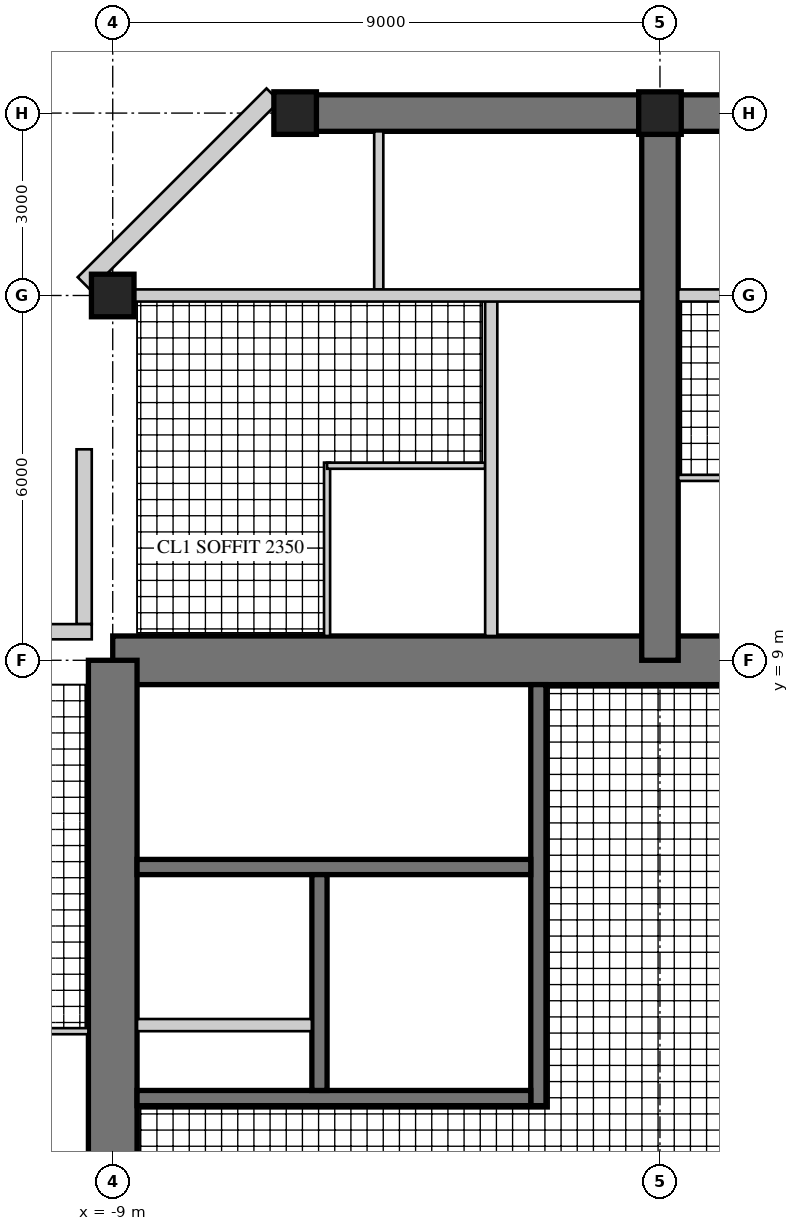
"""IFC4 building model, lengths in metres.
Left out: names, types, materials, properties, quantities, classifications, styles, units other than length and angle.
Written with IfcOpenShell. Run it as: python <this file> out.ifc"""

import sys

from ifc_helpers import new_model, si_unit, direction, frame, frame_2d, origin, origin_2d, place, context, subcontext, project, spatial, rectangle, hollow_rectangle, extrude, element, fill, save


model = new_model("IFC4")
c1 = context("Model", 3, precision=1e-05, world=origin(), true_north=direction((0.0, 1.0)))
c2 = subcontext(c1, "Body", "Model", "MODEL_VIEW")
j1 = project(units=[si_unit("LENGTHUNIT", "METRE"), si_unit("PLANEANGLEUNIT", "RADIAN")], contexts=[c1])
p1 = place(None, origin())
s1 = spatial("IfcSite", under=j1, at=p1, CompositionType="ELEMENT")
p2 = place(p1, origin())
s2 = spatial("IfcBuilding", under=s1, at=p2, CompositionType="ELEMENT")
p3 = place(p2, frame((0.0, 0.0, 278.1)))
s3 = spatial("IfcBuildingStorey", under=s2, at=p3, CompositionType="ELEMENT", Elevation=278.1)
p4 = place(p3, frame((9.0, 9.0, 0.0), z_axis=(0.0, 0.0, 1.0), x_axis=(-1.0, 0.0, 0.0)))
e1 = element("IfcWall", 1, at=p4, inside=s3, PredefinedType="SHEAR", context=c2, shape_type="SweptSolid", body=[
    extrude(rectangle(XDim=18.0, YDim=0.8, at=frame_2d((9.0, 0.0))), origin(), (0.0, 0.0, 1.0), 3.4),
])
p5 = place(p4, frame((9.8, 0.0, 0.0)))
e2 = element("IfcOpeningElement", 2, at=p5, cuts=e1, PredefinedType="OPENING", context=c2, shape_type="SweptSolid", body=[
    extrude(rectangle(XDim=1.0, YDim=2.4, at=frame_2d((0.5, 1.2))), frame((0.0, 0.41, 0.0), z_axis=(0.0, -1.0, 0.0), x_axis=(1.0, 0.0, 0.0)), (0.0, 0.0, 1.0), 0.82),
])
p6 = place(p3, frame((-9.0, 9.0, 0.0), z_axis=(0.0, 0.0, 1.0), x_axis=(0.0, -1.0, 0.0)))
e3 = element("IfcWall", 3, at=p6, inside=s3, PredefinedType="SHEAR", context=c2, shape_type="SweptSolid", body=[
    extrude(rectangle(XDim=18.0, YDim=0.8, at=frame_2d((9.0, 0.0))), origin(), (0.0, 0.0, 1.0), 3.4),
])
p7 = place(p6, frame((9.8, 0.0, 0.0)))
e4 = element("IfcOpeningElement", 4, at=p7, cuts=e3, PredefinedType="OPENING", context=c2, shape_type="SweptSolid", body=[
    extrude(rectangle(XDim=1.0, YDim=2.4, at=frame_2d((0.5, 1.2))), frame((0.0, 0.41, 0.0), z_axis=(0.0, -1.0, 0.0), x_axis=(1.0, 0.0, 0.0)), (0.0, 0.0, 1.0), 0.82),
])
p8 = place(p3, frame((-2.0, 1.675, 0.0), z_axis=(0.0, 0.0, 1.0), x_axis=(0.0, 1.0, 0.0)))
e5 = element("IfcWall", 5, at=p8, inside=s3, PredefinedType="SHEAR", context=c2, shape_type="SweptSolid", body=[
    extrude(rectangle(XDim=6.925, YDim=0.25, at=frame_2d((3.462, 0.0))), origin(), (0.0, 0.0, 1.0), 3.4),
])
p9 = place(p8, frame((0.725, 0.0, 0.0)))
e6 = element("IfcOpeningElement", 6, at=p9, cuts=e5, PredefinedType="OPENING", context=c2, shape_type="SweptSolid", body=[
    extrude(rectangle(XDim=1.0, YDim=2.1, at=frame_2d((0.5, 1.05))), frame((0.0, 0.135, 0.0), z_axis=(0.0, -1.0, 0.0), x_axis=(1.0, 0.0, 0.0)), (0.0, 0.0, 1.0), 0.27),
])
p10 = place(p3, frame((-2.125, 1.8, 0.0), z_axis=(0.0, 0.0, 1.0), x_axis=(-1.0, 0.0, 0.0)))
e7 = element("IfcWall", 7, at=p10, inside=s3, PredefinedType="SHEAR", context=c2, shape_type="SweptSolid", body=[
    extrude(rectangle(XDim=6.475, YDim=0.25, at=frame_2d((3.238, 0.0))), origin(), (0.0, 0.0, 1.0), 3.4),
])
p11 = place(p3, frame((-2.125, 5.6, 0.0), z_axis=(0.0, 0.0, 1.0), x_axis=(-1.0, 0.0, 0.0)))
e8 = element("IfcWall", 8, at=p11, inside=s3, PredefinedType="SHEAR", context=c2, shape_type="SweptSolid", body=[
    extrude(rectangle(XDim=6.475, YDim=0.25, at=frame_2d((3.238, 0.0))), origin(), (0.0, 0.0, 1.0), 3.4),
])
p12 = place(p11, frame((0.175, 0.0, 0.0)))
e9 = element("IfcOpeningElement", 9, at=p12, cuts=e8, PredefinedType="OPENING", context=c2, shape_type="SweptSolid", body=[
    extrude(rectangle(XDim=1.0, YDim=2.1, at=frame_2d((0.5, 1.05))), frame((0.0, 0.135, 0.0), z_axis=(0.0, -1.0, 0.0), x_axis=(1.0, 0.0, 0.0)), (0.0, 0.0, 1.0), 0.27),
])
p13 = place(p3, frame((-5.6, 1.925, 0.0), z_axis=(0.0, 0.0, 1.0), x_axis=(0.0, 1.0, 0.0)))
e10 = element("IfcWall", 10, at=p13, inside=s3, PredefinedType="SHEAR", context=c2, shape_type="SweptSolid", body=[
    extrude(rectangle(XDim=3.55, YDim=0.25, at=frame_2d((1.775, 0.0))), origin(), (0.0, 0.0, 1.0), 3.4),
])
p14 = place(p13, frame((1.525, 0.0, 0.0)))
e11 = element("IfcOpeningElement", 11, at=p14, cuts=e10, PredefinedType="OPENING", context=c2, shape_type="SweptSolid", body=[
    extrude(rectangle(XDim=1.1, YDim=2.2, at=frame_2d((0.55, 1.1))), frame((0.0, 0.135, 0.0), z_axis=(0.0, -1.0, 0.0), x_axis=(1.0, 0.0, 0.0)), (0.0, 0.0, 1.0), 0.27),
])
p15 = place(p13, frame((0.075, 0.0, 0.0)))
e12 = element("IfcOpeningElement", 12, at=p15, cuts=e10, PredefinedType="OPENING", context=c2, shape_type="SweptSolid", body=[
    extrude(rectangle(XDim=0.8, YDim=2.1, at=frame_2d((0.4, 1.05))), frame((0.0, 0.135, 0.0), z_axis=(0.0, -1.0, 0.0), x_axis=(1.0, 0.0, 0.0)), (0.0, 0.0, 1.0), 0.27),
])
p16 = place(p3, frame((-5.725, 3.0, 0.0), z_axis=(0.0, 0.0, 1.0), x_axis=(-1.0, 0.0, 0.0)))
e13 = element("IfcWall", 13, at=p16, inside=s3, PredefinedType="PARTITIONING", context=c2, shape_type="SweptSolid", body=[
    extrude(rectangle(XDim=2.875, YDim=0.2, at=frame_2d((1.438, 0.0))), origin(), (0.0, 0.0, 1.0), 3.4),
])
p17 = place(p3, frame((0.0, 9.0, 0.0), z_axis=(0.0, 0.0, 1.0), x_axis=(0.0, 1.0, 0.0)))
e14 = element("IfcWall", 14, at=p17, inside=s3, PredefinedType="SHEAR", context=c2, shape_type="SweptSolid", body=[
    extrude(rectangle(XDim=9.0, YDim=0.6, at=frame_2d((4.5, 0.0))), origin(), (0.0, 0.0, 1.0), 3.4),
])
p18 = place(p17, frame((3.8, 0.0, 0.0)))
e15 = element("IfcOpeningElement", 15, at=p18, cuts=e14, PredefinedType="OPENING", context=c2, shape_type="SweptSolid", body=[
    extrude(rectangle(XDim=1.0, YDim=2.15, at=frame_2d((0.5, 1.075))), frame((0.0, 0.31, 0.0), z_axis=(0.0, -1.0, 0.0), x_axis=(1.0, 0.0, 0.0)), (0.0, 0.0, 1.0), 0.62),
])
p19 = place(p17, frame((7.0, 0.0, 0.0)))
e16 = element("IfcOpeningElement", 16, at=p19, cuts=e14, PredefinedType="OPENING", context=c2, shape_type="SweptSolid", body=[
    extrude(rectangle(XDim=1.0, YDim=2.2, at=frame_2d((0.5, 1.1))), frame((0.0, 0.31, 0.0), z_axis=(0.0, -1.0, 0.0), x_axis=(1.0, 0.0, 0.0)), (0.0, 0.0, 1.0), 0.62),
])
p20 = place(p3, frame((6.0, 18.0, 0.0), z_axis=(0.0, 0.0, 1.0), x_axis=(-1.0, 0.0, 0.0)))
e17 = element("IfcWall", 17, at=p20, inside=s3, PredefinedType="SHEAR", context=c2, shape_type="SweptSolid", body=[
    extrude(rectangle(XDim=12.0, YDim=0.6, at=frame_2d((6.0, 0.0))), origin(), (0.0, 0.0, 1.0), 3.4),
])
p21 = place(p20, frame((1.625, 0.0, 0.6)))
e18 = element("IfcOpeningElement", 18, at=p21, cuts=e17, PredefinedType="OPENING", context=c2, shape_type="SweptSolid", body=[
    extrude(rectangle(XDim=3.0, YDim=2.4, at=frame_2d((1.5, 1.2))), frame((0.0, 0.31, 0.0), z_axis=(0.0, -1.0, 0.0), x_axis=(1.0, 0.0, 0.0)), (0.0, 0.0, 1.0), 0.62),
])
p22 = place(p20, frame((7.375, 0.0, 0.6)))
e19 = element("IfcOpeningElement", 19, at=p22, cuts=e17, PredefinedType="OPENING", context=c2, shape_type="SweptSolid", body=[
    extrude(rectangle(XDim=3.0, YDim=2.4, at=frame_2d((1.5, 1.2))), frame((0.0, 0.31, 0.0), z_axis=(0.0, -1.0, 0.0), x_axis=(1.0, 0.0, 0.0)), (0.0, 0.0, 1.0), 0.62),
])
for number, where, z_axis, x_axis in (
    (20, (-9.0, 15.0, 0.0), (0.0, 0.0, 1.0), (1.0, 0.0, 0.0)),
    (21, (0.0, 18.0, 0.0), (0.0, 0.0, 1.0), (1.0, 0.0, 0.0)),
    (22, (-6.0, 18.0, 0.0), (0.0, 0.0, 1.0), (1.0, 0.0, 0.0)),
):
    element("IfcColumn", number, at=place(p3, frame(where, z_axis=z_axis, x_axis=x_axis)), inside=s3, PredefinedType="COLUMN", context=c2, shape_type="SweptSolid", body=[
        extrude(rectangle(XDim=0.7, YDim=0.7, at=origin_2d()), origin(), (0.0, 0.0, 1.0), 3.4),
    ])
p23 = place(p3, frame((-6.365, 18.3, 0.0), z_axis=(0.0, 0.0, 1.0), x_axis=(-0.70707898447, -0.707134576811, 0.0)))
e23 = element("IfcWall", 23, at=p23, inside=s3, PredefinedType="SOLIDWALL", context=c2, shape_type="SweptSolid", body=[
    extrude(rectangle(XDim=4.392, YDim=0.3, at=frame_2d((2.196, 0.0))), origin(), (0.0, 0.0, 1.0), 3.22),
])
p24 = place(p23, frame((1.746, 0.0, 0.3)))
e24 = element("IfcOpeningElement", 24, at=p24, cuts=e23, PredefinedType="OPENING", context=c2, shape_type="SweptSolid", body=[
    extrude(rectangle(XDim=0.9, YDim=2.4, at=frame_2d((0.45, 1.2))), frame((0.0, 0.16, 0.0), z_axis=(0.0, -1.0, 0.0), x_axis=(1.0, 0.0, 0.0)), (0.0, 0.0, 1.0), 0.32),
])
p25 = place(p3, frame((-9.47, 12.47, 0.0), z_axis=(0.0, 0.0, 1.0), x_axis=(0.0, -1.0, 0.0)))
e25 = element("IfcWall", 25, at=p25, inside=s3, PredefinedType="SOLIDWALL", context=c2, shape_type="SweptSolid", body=[
    extrude(rectangle(XDim=2.875, YDim=0.25, at=frame_2d((1.438, 0.0))), origin(), (0.0, 0.0, 1.0), 3.22),
])
p26 = place(p25, frame((0.6, 0.0, 0.0)))
e26 = element("IfcOpeningElement", 26, at=p26, cuts=e25, PredefinedType="OPENING", context=c2, shape_type="SweptSolid", body=[
    extrude(rectangle(XDim=1.0, YDim=2.2, at=frame_2d((0.5, 1.1))), frame((0.0, 0.135, 0.0), z_axis=(0.0, -1.0, 0.0), x_axis=(1.0, 0.0, 0.0)), (0.0, 0.0, 1.0), 0.27),
])
p27 = place(p3, frame((-9.345, 9.47, 0.0), z_axis=(0.0, 0.0, 1.0), x_axis=(-1.0, 0.0, 0.0)))
e27 = element("IfcWall", 27, at=p27, inside=s3, PredefinedType="SOLIDWALL", context=c2, shape_type="SweptSolid", body=[
    extrude(rectangle(XDim=3.125, YDim=0.25, at=frame_2d((1.562, 0.0))), origin(), (0.0, 0.0, 1.0), 3.22),
])
p28 = place(p27, frame((0.6, 0.0, 0.0)))
e28 = element("IfcOpeningElement", 28, at=p28, cuts=e27, PredefinedType="OPENING", context=c2, shape_type="SweptSolid", body=[
    extrude(rectangle(XDim=1.0, YDim=2.2, at=frame_2d((0.5, 1.1))), frame((0.0, 0.135, 0.0), z_axis=(0.0, -1.0, 0.0), x_axis=(1.0, 0.0, 0.0)), (0.0, 0.0, 1.0), 0.27),
])
p29 = place(p3, frame((-5.475, 9.4, 0.0), z_axis=(0.0, 0.0, 1.0), x_axis=(0.0, 1.0, 0.0)))
e29 = element("IfcWall", 29, at=p29, inside=s3, PredefinedType="PARTITIONING", context=c2, shape_type="SweptSolid", body=[
    extrude(rectangle(XDim=2.85, YDim=0.1, at=frame_2d((1.425, 0.0))), origin(), (0.0, 0.0, 1.0), 3.22),
])
p30 = place(p3, frame((-2.875, 12.2, 0.0), z_axis=(0.0, 0.0, 1.0), x_axis=(-1.0, 0.0, 0.0)))
e30 = element("IfcWall", 30, at=p30, inside=s3, PredefinedType="PARTITIONING", context=c2, shape_type="SweptSolid", body=[
    extrude(rectangle(XDim=2.6, YDim=0.1, at=frame_2d((1.3, 0.0))), origin(), (0.0, 0.0, 1.0), 3.22),
])
p31 = place(p30, frame((0.55, 0.0, 0.0)))
e31 = element("IfcOpeningElement", 31, at=p31, cuts=e30, PredefinedType="OPENING", context=c2, shape_type="SweptSolid", body=[
    extrude(rectangle(XDim=0.9, YDim=2.1, at=frame_2d((0.45, 1.05))), frame((0.0, 0.06, 0.0), z_axis=(0.0, -1.0, 0.0), x_axis=(1.0, 0.0, 0.0)), (0.0, 0.0, 1.0), 0.12),
])
p32 = place(p3, frame((9.345, 12.0, 0.0), z_axis=(0.0, 0.0, 1.0), x_axis=(-1.0, 0.0, 0.0)))
e32 = element("IfcWall", 32, at=p32, inside=s3, PredefinedType="PARTITIONING", context=c2, shape_type="SweptSolid", body=[
    extrude(rectangle(XDim=9.045, YDim=0.1, at=frame_2d((4.522, 0.0))), origin(), (0.0, 0.0, 1.0), 3.22),
])
p33 = place(p32, frame((5.495, 0.0, 0.0)))
e33 = element("IfcOpeningElement", 33, at=p33, cuts=e32, PredefinedType="OPENING", context=c2, shape_type="SweptSolid", body=[
    extrude(rectangle(XDim=0.9, YDim=2.1, at=frame_2d((0.45, 1.05))), frame((0.0, 0.06, 0.0), z_axis=(0.0, -1.0, 0.0), x_axis=(1.0, 0.0, 0.0)), (0.0, 0.0, 1.0), 0.12),
])
p34 = place(p32, frame((7.595, 0.0, 0.0)))
e34 = element("IfcOpeningElement", 34, at=p34, cuts=e32, PredefinedType="OPENING", context=c2, shape_type="SweptSolid", body=[
    extrude(rectangle(XDim=0.9, YDim=2.1, at=frame_2d((0.45, 1.05))), frame((0.0, 0.06, 0.0), z_axis=(0.0, -1.0, 0.0), x_axis=(1.0, 0.0, 0.0)), (0.0, 0.0, 1.0), 0.12),
])
p35 = place(p3, frame((-2.775, 9.4, 0.0), z_axis=(0.0, 0.0, 1.0), x_axis=(0.0, 1.0, 0.0)))
e35 = element("IfcWall", 35, at=p35, inside=s3, PredefinedType="SOLIDWALL", context=c2, shape_type="SweptSolid", body=[
    extrude(rectangle(XDim=5.6, YDim=0.2, at=frame_2d((2.8, 0.0))), origin(), (0.0, 0.0, 1.0), 3.22),
])
p36 = place(p35, frame((3.4, 0.0, 0.0)))
e36 = element("IfcOpeningElement", 36, at=p36, cuts=e35, PredefinedType="OPENING", context=c2, shape_type="SweptSolid", body=[
    extrude(rectangle(XDim=1.0, YDim=2.15, at=frame_2d((0.5, 1.075))), frame((0.0, 0.11, 0.0), z_axis=(0.0, -1.0, 0.0), x_axis=(1.0, 0.0, 0.0)), (0.0, 0.0, 1.0), 0.22),
])
p37 = place(p3, frame((-4.625, 15.1, 0.0), z_axis=(0.0, 0.0, 1.0), x_axis=(0.0, 1.0, 0.0)))
e37 = element("IfcWall", 37, at=p37, inside=s3, PredefinedType="PARTITIONING", context=c2, shape_type="SweptSolid", body=[
    extrude(rectangle(XDim=2.6, YDim=0.15, at=frame_2d((1.3, 0.0))), origin(), (0.0, 0.0, 1.0), 3.22),
])
p38 = place(p37, frame((0.6, 0.0, 0.0)))
e38 = element("IfcOpeningElement", 38, at=p38, cuts=e37, PredefinedType="OPENING", context=c2, shape_type="SweptSolid", body=[
    extrude(rectangle(XDim=1.0, YDim=2.1, at=frame_2d((0.5, 1.05))), frame((0.0, 0.085, 0.0), z_axis=(0.0, -1.0, 0.0), x_axis=(1.0, 0.0, 0.0)), (0.0, 0.0, 1.0), 0.17),
])
p39 = place(p3, frame((8.65, 15.0, 0.0), z_axis=(0.0, 0.0, 1.0), x_axis=(-1.0, 0.0, 0.0)))
e39 = element("IfcWall", 39, at=p39, inside=s3, PredefinedType="SOLIDWALL", context=c2, shape_type="SweptSolid", body=[
    extrude(rectangle(XDim=8.35, YDim=0.2, at=frame_2d((4.175, 0.0))), origin(), (0.0, 0.0, 1.0), 2.52),
])
p40 = place(p3, frame((-0.3, 15.0, 0.0), z_axis=(0.0, 0.0, 1.0), x_axis=(-1.0, 0.0, 0.0)))
e40 = element("IfcWall", 40, at=p40, inside=s3, PredefinedType="SOLIDWALL", context=c2, shape_type="SweptSolid", body=[
    extrude(rectangle(XDim=8.35, YDim=0.2, at=frame_2d((4.175, 0.0))), origin(), (0.0, 0.0, 1.0), 2.52),
])
p41 = place(p40, frame((0.4, 0.0, 0.0)))
e41 = element("IfcOpeningElement", 41, at=p41, cuts=e40, PredefinedType="OPENING", context=c2, shape_type="SweptSolid", body=[
    extrude(rectangle(XDim=1.0, YDim=2.2, at=frame_2d((0.5, 1.1))), frame((0.0, 0.11, 0.0), z_axis=(0.0, -1.0, 0.0), x_axis=(1.0, 0.0, 0.0)), (0.0, 0.0, 1.0), 0.22),
])
p42 = place(p3, frame((-9.4, 2.9, 0.0), z_axis=(0.0, 0.0, 1.0), x_axis=(-1.0, 0.0, 0.0)))
e42 = element("IfcWall", 42, at=p42, inside=s3, PredefinedType="PARTITIONING", context=c2, shape_type="SweptSolid", body=[
    extrude(rectangle(XDim=2.85, YDim=0.1, at=frame_2d((1.425, 0.0))), origin(), (0.0, 0.0, 1.0), 3.22),
])
p43 = place(p22, origin())
e43 = element("IfcWindow", 43, at=p43, inside=s3, PartitioningType="SINGLE_PANEL", PredefinedType="WINDOW", context=c2, shape_type="SweptSolid", body=[
    extrude(hollow_rectangle(XDim=3.0, YDim=2.4, WallThickness=0.06, at=frame_2d((1.5, 1.2))), frame((0.0, 0.03, 0.0), z_axis=(0.0, -1.0, 0.0), x_axis=(1.0, 0.0, 0.0)), (0.0, 0.0, 1.0), 0.06),
    extrude(rectangle(XDim=2.879, YDim=2.279, at=frame_2d((1.5, 1.2))), frame((0.0, 0.03, 0.0), z_axis=(0.0, -1.0, 0.0), x_axis=(1.0, 0.0, 0.0)), (0.0, 0.0, 1.0), 0.06),
])
fill(e19, e43)
p44 = place(p24, origin())
e44 = element("IfcWindow", 44, at=p44, inside=s3, PartitioningType="SINGLE_PANEL", PredefinedType="WINDOW", context=c2, shape_type="SweptSolid", body=[
    extrude(hollow_rectangle(XDim=0.9, YDim=2.4, WallThickness=0.06, at=frame_2d((0.45, 1.2))), frame((0.0, 0.03, 0.0), z_axis=(0.0, -1.0, 0.0), x_axis=(1.0, 0.0, 0.0)), (0.0, 0.0, 1.0), 0.06),
    extrude(rectangle(XDim=0.779, YDim=2.279, at=frame_2d((0.45, 1.2))), frame((0.0, 0.03, 0.0), z_axis=(0.0, -1.0, 0.0), x_axis=(1.0, 0.0, 0.0)), (0.0, 0.0, 1.0), 0.06),
])
fill(e24, e44)
p45 = place(p26, origin())
e45 = element("IfcDoor", 45, at=p45, inside=s3, OperationType="SINGLE_SWING_RIGHT", PredefinedType="DOOR", context=c2, shape_type="SweptSolid", body=[
    extrude(hollow_rectangle(XDim=1.0, YDim=2.2, WallThickness=0.06, at=frame_2d((0.5, 1.1))), frame((0.0, 0.025, 0.0), z_axis=(0.0, -1.0, 0.0), x_axis=(1.0, 0.0, 0.0)), (0.0, 0.0, 1.0), 0.05),
    extrude(rectangle(XDim=0.879, YDim=2.079, at=frame_2d((0.5, 1.1))), frame((0.0, 0.025, 0.0), z_axis=(0.0, -1.0, 0.0), x_axis=(1.0, 0.0, 0.0)), (0.0, 0.0, 1.0), 0.05),
])
fill(e26, e45)
p46 = place(p28, origin())
e46 = element("IfcDoor", 46, at=p46, inside=s3, OperationType="SINGLE_SWING_LEFT", PredefinedType="DOOR", context=c2, shape_type="SweptSolid", body=[
    extrude(hollow_rectangle(XDim=1.0, YDim=2.2, WallThickness=0.06, at=frame_2d((0.5, 1.1))), frame((0.0, 0.025, 0.0), z_axis=(0.0, -1.0, 0.0), x_axis=(1.0, 0.0, 0.0)), (0.0, 0.0, 1.0), 0.05),
    extrude(rectangle(XDim=0.879, YDim=2.079, at=frame_2d((0.5, 1.1))), frame((0.0, 0.025, 0.0), z_axis=(0.0, -1.0, 0.0), x_axis=(1.0, 0.0, 0.0)), (0.0, 0.0, 1.0), 0.05),
])
fill(e28, e46)
p47 = place(p31, origin())
e47 = element("IfcDoor", 47, at=p47, inside=s3, OperationType="SINGLE_SWING_LEFT", PredefinedType="DOOR", context=c2, shape_type="SweptSolid", body=[
    extrude(rectangle(XDim=0.9, YDim=2.1, at=frame_2d((0.45, 1.05))), frame((0.0, 0.025, 0.0), z_axis=(0.0, -1.0, 0.0), x_axis=(1.0, 0.0, 0.0)), (0.0, 0.0, 1.0), 0.05),
])
fill(e31, e47)
p48 = place(p34, origin())
e48 = element("IfcDoor", 48, at=p48, inside=s3, OperationType="SINGLE_SWING_RIGHT", PredefinedType="DOOR", context=c2, shape_type="SweptSolid", body=[
    extrude(rectangle(XDim=0.9, YDim=2.1, at=frame_2d((0.45, 1.05))), frame((0.0, 0.025, 0.0), z_axis=(0.0, -1.0, 0.0), x_axis=(1.0, 0.0, 0.0)), (0.0, 0.0, 1.0), 0.05),
])
fill(e34, e48)
p49 = place(p36, origin())
e49 = element("IfcDoor", 49, at=p49, inside=s3, OperationType="SINGLE_SWING_LEFT", PredefinedType="DOOR", context=c2, shape_type="SweptSolid", body=[
    extrude(rectangle(XDim=1.0, YDim=2.15, at=frame_2d((0.5, 1.075))), frame((0.0, 0.025, 0.0), z_axis=(0.0, -1.0, 0.0), x_axis=(1.0, 0.0, 0.0)), (0.0, 0.0, 1.0), 0.05),
])
fill(e36, e49)
p50 = place(p38, origin())
e50 = element("IfcDoor", 50, at=p50, inside=s3, OperationType="SINGLE_SWING_LEFT", PredefinedType="DOOR", context=c2, shape_type="SweptSolid", body=[
    extrude(rectangle(XDim=1.0, YDim=2.1, at=frame_2d((0.5, 1.05))), frame((0.0, 0.025, 0.0), z_axis=(0.0, -1.0, 0.0), x_axis=(1.0, 0.0, 0.0)), (0.0, 0.0, 1.0), 0.05),
])
fill(e38, e50)
p51 = place(p41, frame((1.0, 0.0, 0.0), z_axis=(0.0, 0.0, 1.0), x_axis=(-1.0, 0.0, 0.0)))
e51 = element("IfcDoor", 51, at=p51, inside=s3, OperationType="SINGLE_SWING_RIGHT", PredefinedType="DOOR", context=c2, shape_type="SweptSolid", body=[
    extrude(rectangle(XDim=1.0, YDim=2.2, at=frame_2d((0.5, 1.1))), frame((0.0, 0.025, 0.0), z_axis=(0.0, -1.0, 0.0), x_axis=(1.0, 0.0, 0.0)), (0.0, 0.0, 1.0), 0.05),
])
fill(e41, e51)
p52 = place(p18, frame((1.0, 0.0, 0.0), z_axis=(0.0, 0.0, 1.0), x_axis=(-1.0, 0.0, 0.0)))
e52 = element("IfcDoor", 52, at=p52, inside=s3, OperationType="SINGLE_SWING_RIGHT", PredefinedType="DOOR", context=c2, shape_type="SweptSolid", body=[
    extrude(rectangle(XDim=1.0, YDim=2.15, at=frame_2d((0.5, 1.075))), frame((0.0, 0.025, 0.0), z_axis=(0.0, -1.0, 0.0), x_axis=(1.0, 0.0, 0.0)), (0.0, 0.0, 1.0), 0.05),
])
fill(e15, e52)
p53 = place(p19, origin())
e53 = element("IfcDoor", 53, at=p53, inside=s3, OperationType="SINGLE_SWING_RIGHT", PredefinedType="DOOR", context=c2, shape_type="SweptSolid", body=[
    extrude(rectangle(XDim=1.0, YDim=2.2, at=frame_2d((0.5, 1.1))), frame((0.0, 0.025, 0.0), z_axis=(0.0, -1.0, 0.0), x_axis=(1.0, 0.0, 0.0)), (0.0, 0.0, 1.0), 0.05),
])
fill(e16, e53)
p54 = place(p5, origin())
e54 = element("IfcDoor", 54, at=p54, inside=s3, OperationType="SINGLE_SWING_RIGHT", PredefinedType="DOOR", context=c2, shape_type="SweptSolid", body=[
    extrude(rectangle(XDim=1.0, YDim=2.4, at=frame_2d((0.5, 1.2))), frame((0.0, 0.055, 0.0), z_axis=(0.0, -1.0, 0.0), x_axis=(1.0, 0.0, 0.0)), (0.0, 0.0, 1.0), 0.05),
])
fill(e2, e54)
p55 = place(p9, origin())
e55 = element("IfcDoor", 55, at=p55, inside=s3, OperationType="SINGLE_SWING_LEFT", PredefinedType="DOOR", context=c2, shape_type="SweptSolid", body=[
    extrude(rectangle(XDim=1.0, YDim=2.1, at=frame_2d((0.5, 1.05))), frame((0.0, 0.025, 0.0), z_axis=(0.0, -1.0, 0.0), x_axis=(1.0, 0.0, 0.0)), (0.0, 0.0, 1.0), 0.05),
])
fill(e6, e55)
p56 = place(p12, frame((1.0, 0.0, 0.0), z_axis=(0.0, 0.0, 1.0), x_axis=(-1.0, 0.0, 0.0)))
e56 = element("IfcDoor", 56, at=p56, inside=s3, OperationType="SINGLE_SWING_RIGHT", PredefinedType="DOOR", context=c2, shape_type="SweptSolid", body=[
    extrude(rectangle(XDim=1.0, YDim=2.1, at=frame_2d((0.5, 1.05))), frame((0.0, 0.025, 0.0), z_axis=(0.0, -1.0, 0.0), x_axis=(1.0, 0.0, 0.0)), (0.0, 0.0, 1.0), 0.05),
])
fill(e9, e56)
p57 = place(p14, origin())
e57 = element("IfcDoor", 57, at=p57, inside=s3, OperationType="DOUBLE_DOOR_SLIDING", PredefinedType="DOOR", context=c2, shape_type="SweptSolid", body=[
    extrude(rectangle(XDim=1.1, YDim=2.2, at=frame_2d((0.55, 1.1))), frame((0.0, 0.025, 0.0), z_axis=(0.0, -1.0, 0.0), x_axis=(1.0, 0.0, 0.0)), (0.0, 0.0, 1.0), 0.05),
])
fill(e11, e57)
p58 = place(p15, origin())
e58 = element("IfcDoor", 58, at=p58, inside=s3, OperationType="SINGLE_SWING_LEFT", PredefinedType="DOOR", context=c2, shape_type="SweptSolid", body=[
    extrude(rectangle(XDim=0.8, YDim=2.1, at=frame_2d((0.4, 1.05))), frame((0.0, 0.025, 0.0), z_axis=(0.0, -1.0, 0.0), x_axis=(1.0, 0.0, 0.0)), (0.0, 0.0, 1.0), 0.05),
])
fill(e12, e58)
save(model, sys.argv[1])
